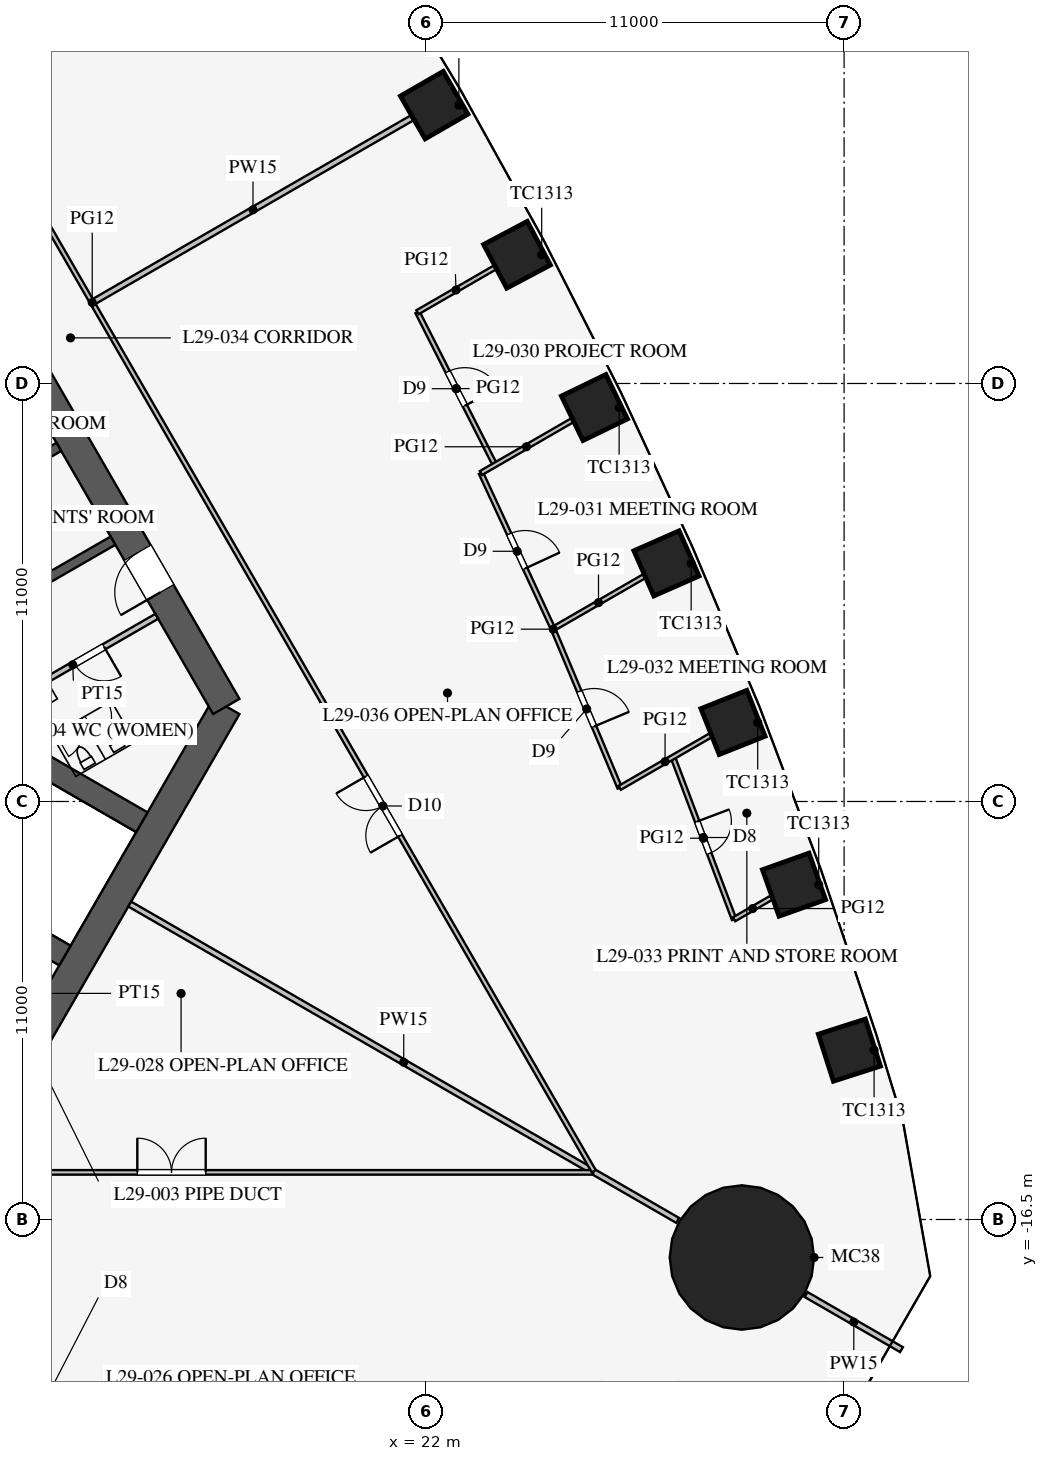
"""IFC4 building model, lengths in metres.
Left out: names, types, materials, properties, quantities, classifications, styles, units other than length and angle.
Written with IfcOpenShell. Run it as: python <this file> out.ifc"""

import sys

from ifc_helpers import new_model, si_unit, direction, frame, frame_2d, origin, origin_2d, place, context, subcontext, project, spatial, rectangle, circle, extrude, element, fill, save


model = new_model("IFC4")
c1 = context("Model", 3, precision=1e-05, world=origin(), true_north=direction((0.0, 1.0)))
c2 = subcontext(c1, "Body", "Model", "MODEL_VIEW")
j1 = project(units=[si_unit("LENGTHUNIT", "METRE"), si_unit("PLANEANGLEUNIT", "RADIAN")], contexts=[c1])
p1 = place(None, origin())
s1 = spatial("IfcSite", under=j1, at=p1, CompositionType="ELEMENT")
p2 = place(p1, origin())
s2 = spatial("IfcBuilding", under=s1, at=p2, CompositionType="ELEMENT")
p3 = place(p2, frame((0.0, 0.0, 128.3)))
s3 = spatial("IfcBuildingStorey", under=s2, at=p3, CompositionType="ELEMENT", Elevation=128.3)
for number, where, z_axis, x_axis in (
    (1, (33.139, -12.044, 0.0), (0.0, 0.0, 1.0), (-0.305, 0.952, 0.0)),
    (2, (31.682, -7.689, 0.0), (0.0, 0.0, 1.0), (-0.336, 0.942, 0.0)),
    (3, (30.077, -3.42, 0.0), (0.0, 0.0, 1.0), (-0.37, 0.929, 0.0)),
    (4, (28.325, 0.765, 0.0), (0.0, 0.0, 1.0), (-0.403, 0.915, 0.0)),
    (5, (26.43, 4.867, 0.0), (0.0, 0.0, 1.0), (-0.436, 0.9, 0.0)),
    (6, (24.393, 8.887, 0.0), (0.0, 0.0, 1.0), (-0.468, 0.883, 0.0)),
    (7, (22.213, 12.825, 0.0), (0.0, 0.0, 1.0), (-0.5, 0.866, 0.0)),
):
    element("IfcColumn", number, at=place(p3, frame(where, z_axis=z_axis, x_axis=x_axis)), inside=s3, PredefinedType="COLUMN", context=c2, shape_type="SweptSolid", body=[
        extrude(rectangle(XDim=1.3, YDim=1.3, at=origin_2d()), origin(), (0.0, 0.0, 1.0), 4.2),
    ])
p4 = place(p3, frame((30.311, -17.5, 0.0), z_axis=(0.0, 0.0, 1.0), x_axis=(1.0, 0.0, 0.0)))
e8 = element("IfcColumn", 8, at=p4, inside=s3, PredefinedType="COLUMN", context=c2, shape_type="SweptSolid", body=[
    extrude(circle(Radius=1.9, at=origin_2d()), origin(), (0.0, 0.0, 1.0), 4.2),
])
p5 = place(p3, frame((10.97, -13.0, 0.0), z_axis=(0.0, 0.0, 1.0), x_axis=(0.499995765644, 0.866027848477, 0.0)))
e9 = element("IfcWall", 9, at=p5, inside=s3, PredefinedType="SHEAR", context=c2, shape_type="SweptSolid", body=[
    extrude(rectangle(XDim=11.547, YDim=0.8, at=frame_2d((5.773, 0.0))), origin(), (0.0, 0.0, 1.0), 4.2),
])
p6 = place(p3, frame((16.743, -3.0, 0.0), z_axis=(0.0, 0.0, 1.0), x_axis=(-0.500002442456, 0.866023993627, 0.0)))
e10 = element("IfcWall", 10, at=p6, inside=s3, PredefinedType="SHEAR", context=c2, shape_type="SweptSolid", body=[
    extrude(rectangle(XDim=21.939, YDim=0.8, at=frame_2d((10.97, 0.0))), origin(), (0.0, 0.0, 1.0), 4.2),
])
p7 = place(p6, frame((17.27, 0.0, 0.0)))
e11 = element("IfcOpeningElement", 11, at=p7, cuts=e10, PredefinedType="OPENING", context=c2, shape_type="SweptSolid", body=[
    extrude(rectangle(XDim=1.2, YDim=2.1, at=frame_2d((0.6, 1.05))), frame((0.0, 0.41, 0.0), z_axis=(0.0, -1.0, 0.0), x_axis=(1.0, 0.0, 0.0)), (0.0, 0.0, 1.0), 0.82),
])
p8 = place(p6, frame((3.47, 0.0, 0.0)))
e12 = element("IfcOpeningElement", 12, at=p8, cuts=e10, PredefinedType="OPENING", context=c2, shape_type="SweptSolid", body=[
    extrude(rectangle(XDim=1.2, YDim=2.1, at=frame_2d((0.6, 1.05))), frame((0.0, 0.41, 0.0), z_axis=(0.0, -1.0, 0.0), x_axis=(1.0, 0.0, 0.0)), (0.0, 0.0, 1.0), 0.82),
])
for number, where, z_axis, x_axis in (
    (13, (11.532, 0.076, 0.0), (0.0, 0.0, 1.0), (0.866, 0.5, 0.0)),
    (14, (10.107, 2.544, 0.0), (0.0, 0.0, 1.0), (0.866, 0.5, 0.0)),
):
    element("IfcWall", number, at=place(p3, frame(where, z_axis=z_axis, x_axis=x_axis)), inside=s3, PredefinedType="SHEAR", context=c2, shape_type="SweptSolid", body=[
        extrude(rectangle(XDim=2.575, YDim=0.25, at=frame_2d((1.288, 0.0))), origin(), (0.0, 0.0, 1.0), 4.2),
    ])
for number, where, z_axis, x_axis in (
    (15, (4.638, -5.016, 0.0), (0.0, 0.0, 1.0), (0.866, -0.5, 0.0)),
    (16, (6.663, -1.509, 0.0), (0.0, 0.0, 1.0), (0.866, -0.5, 0.0)),
):
    element("IfcWall", number, at=place(p3, frame(where, z_axis=z_axis, x_axis=x_axis)), inside=s3, PredefinedType="SHEAR", context=c2, shape_type="SweptSolid", body=[
        extrude(rectangle(XDim=9.075, YDim=0.6, at=frame_2d((4.538, 0.0))), origin(), (0.0, 0.0, 1.0), 4.2),
    ])
p9 = place(p3, frame((10.495, -3.178, 0.0), z_axis=(0.0, 0.0, 1.0), x_axis=(0.86602216432, 0.500005610874, 0.0)))
e17 = element("IfcWall", 17, at=p9, inside=s3, PredefinedType="PARTITIONING", context=c2, shape_type="SweptSolid", body=[
    extrude(rectangle(XDim=5.1, YDim=0.15, at=frame_2d((2.55, 0.0))), origin(), (0.0, 0.0, 1.0), 4.0),
])
p10 = place(p9, frame((2.6, 0.0, 0.0)))
e18 = element("IfcOpeningElement", 18, at=p10, cuts=e17, PredefinedType="OPENING", context=c2, shape_type="SweptSolid", body=[
    extrude(rectangle(XDim=0.9, YDim=2.1, at=frame_2d((0.45, 1.05))), frame((0.0, 0.085, 0.0), z_axis=(0.0, -1.0, 0.0), x_axis=(1.0, 0.0, 0.0)), (0.0, 0.0, 1.0), 0.17),
])
p11 = place(p3, frame((14.203, -8.2, 0.0), z_axis=(0.0, 0.0, 1.0), x_axis=(0.866024668836, -0.500001272966, 0.0)))
e19 = element("IfcWall", 19, at=p11, inside=s3, PredefinedType="PARTITIONING", context=c2, shape_type="SweptSolid", body=[
    extrude(rectangle(XDim=16.65, YDim=0.15, at=frame_2d((8.325, 0.0))), origin(), (0.0, 0.0, 1.0), 2.3),
])
p12 = place(p3, frame((32.0, -18.475, 0.0), z_axis=(0.0, 0.0, 1.0), x_axis=(0.866042548026, -0.499970304126, 0.0)))
e20 = element("IfcWall", 20, at=p12, inside=s3, PredefinedType="PARTITIONING", context=c2, shape_type="SweptSolid", body=[
    extrude(rectangle(XDim=2.899, YDim=0.15, at=frame_2d((1.45, 0.0))), origin(), (0.0, 0.0, 1.0), 2.3),
])
p13 = place(p3, frame((-26.398, -15.26, 0.0), z_axis=(0.0, 0.0, 1.0), x_axis=(1.0, 0.0, 0.0)))
e21 = element("IfcWall", 21, at=p13, inside=s3, PredefinedType="PARTITIONING", context=c2, shape_type="SweptSolid", body=[
    extrude(rectangle(XDim=52.796, YDim=0.12, at=frame_2d((26.398, 0.0))), origin(), (0.0, 0.0, 1.0), 2.9),
])
p14 = place(p13, frame((10.2, 0.0, 0.15)))
e22 = element("IfcOpeningElement", 22, at=p14, cuts=e21, PredefinedType="OPENING", context=c2, shape_type="SweptSolid", body=[
    extrude(rectangle(XDim=1.8, YDim=2.1, at=frame_2d((0.9, 1.05))), frame((0.0, 0.07, 0.0), z_axis=(0.0, -1.0, 0.0), x_axis=(1.0, 0.0, 0.0)), (0.0, 0.0, 1.0), 0.14),
])
p15 = place(p13, frame((40.8, 0.0, 0.15)))
e23 = element("IfcOpeningElement", 23, at=p15, cuts=e21, PredefinedType="OPENING", context=c2, shape_type="SweptSolid", body=[
    extrude(rectangle(XDim=1.8, YDim=2.1, at=frame_2d((0.9, 1.05))), frame((0.0, 0.07, 0.0), z_axis=(0.0, -1.0, 0.0), x_axis=(1.0, 0.0, 0.0)), (0.0, 0.0, 1.0), 0.14),
])
p16 = place(p3, frame((13.268, 7.66, 0.0), z_axis=(0.0, 0.0, 1.0), x_axis=(0.866015788683, 0.500016653474, 0.0)))
e24 = element("IfcWall", 24, at=p16, inside=s3, PredefinedType="PARTITIONING", context=c2, shape_type="SweptSolid", body=[
    extrude(rectangle(XDim=9.65, YDim=0.15, at=frame_2d((4.825, 0.0))), origin(), (0.0, 0.0, 1.0), 3.2),
])
p17 = place(p3, frame((26.415, -15.231, 0.0), z_axis=(0.0, 0.0, 1.0), x_axis=(-0.50000091641, 0.866024874695, 0.0)))
e25 = element("IfcWall", 25, at=p17, inside=s3, PredefinedType="PARTITIONING", context=c2, shape_type="SweptSolid", body=[
    extrude(rectangle(XDim=52.796, YDim=0.12, at=frame_2d((26.398, 0.0))), origin(), (0.0, 0.0, 1.0), 2.9),
])
p18 = place(p17, frame((10.2, 0.0, 0.15)))
e26 = element("IfcOpeningElement", 26, at=p18, cuts=e25, PredefinedType="OPENING", context=c2, shape_type="SweptSolid", body=[
    extrude(rectangle(XDim=1.8, YDim=2.1, at=frame_2d((0.9, 1.05))), frame((0.0, 0.07, 0.0), z_axis=(0.0, -1.0, 0.0), x_axis=(1.0, 0.0, 0.0)), (0.0, 0.0, 1.0), 0.14),
])
p19 = place(p17, frame((40.8, 0.0, 0.15)))
e27 = element("IfcOpeningElement", 27, at=p19, cuts=e25, PredefinedType="OPENING", context=c2, shape_type="SweptSolid", body=[
    extrude(rectangle(XDim=1.8, YDim=2.1, at=frame_2d((0.9, 1.05))), frame((0.0, 0.07, 0.0), z_axis=(0.0, -1.0, 0.0), x_axis=(1.0, 0.0, 0.0)), (0.0, 0.0, 1.0), 0.14),
])
p20 = place(p3, frame((25.342, -0.958, 0.0), z_axis=(0.0, 0.0, 1.0), x_axis=(-0.419883773418, 0.907577884713, 0.0)))
e28 = element("IfcWall", 28, at=p20, inside=s3, PredefinedType="PARTITIONING", context=c2, shape_type="SweptSolid", body=[
    extrude(rectangle(XDim=4.519, YDim=0.12, at=frame_2d((2.259, 0.0))), origin(), (0.0, 0.0, 1.0), 2.9),
])
p21 = place(p20, frame((1.75, 0.0, 0.15)))
e29 = element("IfcOpeningElement", 29, at=p21, cuts=e28, PredefinedType="OPENING", context=c2, shape_type="SweptSolid", body=[
    extrude(rectangle(XDim=1.0, YDim=2.1, at=frame_2d((0.5, 1.05))), frame((0.0, 0.07, 0.0), z_axis=(0.0, -1.0, 0.0), x_axis=(1.0, 0.0, 0.0)), (0.0, 0.0, 1.0), 0.14),
])
p22 = place(p3, frame((27.096, -5.141, 0.0), z_axis=(0.0, 0.0, 1.0), x_axis=(-0.386807881778, 0.922160323693, 0.0)))
e30 = element("IfcWall", 30, at=p22, inside=s3, PredefinedType="PARTITIONING", context=c2, shape_type="SweptSolid", body=[
    extrude(rectangle(XDim=4.536, YDim=0.12, at=frame_2d((2.268, 0.0))), origin(), (0.0, 0.0, 1.0), 2.9),
])
p23 = place(p22, frame((1.75, 0.0, 0.15)))
e31 = element("IfcOpeningElement", 31, at=p23, cuts=e30, PredefinedType="OPENING", context=c2, shape_type="SweptSolid", body=[
    extrude(rectangle(XDim=1.0, YDim=2.1, at=frame_2d((0.5, 1.05))), frame((0.0, 0.07, 0.0), z_axis=(0.0, -1.0, 0.0), x_axis=(1.0, 0.0, 0.0)), (0.0, 0.0, 1.0), 0.14),
])
p24 = place(p3, frame((30.104, -8.6, 0.0), z_axis=(0.0, 0.0, 1.0), x_axis=(-0.35295910498, 0.935638749845, 0.0)))
e32 = element("IfcWall", 32, at=p24, inside=s3, PredefinedType="PARTITIONING", context=c2, shape_type="SweptSolid", body=[
    extrude(rectangle(XDim=4.56, YDim=0.12, at=frame_2d((2.28, 0.0))), origin(), (0.0, 0.0, 1.0), 2.9),
])
p25 = place(p24, frame((1.85, 0.0, 0.15)))
e33 = element("IfcOpeningElement", 33, at=p25, cuts=e32, PredefinedType="OPENING", context=c2, shape_type="SweptSolid", body=[
    extrude(rectangle(XDim=0.9, YDim=2.1, at=frame_2d((0.45, 1.05))), frame((0.0, 0.07, 0.0), z_axis=(0.0, -1.0, 0.0), x_axis=(1.0, 0.0, 0.0)), (0.0, 0.0, 1.0), 0.14),
])
p26 = place(p3, frame((23.812, 3.356, 0.0), z_axis=(0.0, 0.0, 1.0), x_axis=(-0.452449820092, 0.891789863308, 0.0)))
e34 = element("IfcWall", 34, at=p26, inside=s3, PredefinedType="PARTITIONING", context=c2, shape_type="SweptSolid", body=[
    extrude(rectangle(XDim=4.507, YDim=0.12, at=frame_2d((2.253, 0.0))), origin(), (0.0, 0.0, 1.0), 2.9),
])
p27 = place(p26, frame((1.75, 0.0, 0.15)))
e35 = element("IfcOpeningElement", 35, at=p27, cuts=e34, PredefinedType="OPENING", context=c2, shape_type="SweptSolid", body=[
    extrude(rectangle(XDim=1.0, YDim=2.1, at=frame_2d((0.5, 1.05))), frame((0.0, 0.07, 0.0), z_axis=(0.0, -1.0, 0.0), x_axis=(1.0, 0.0, 0.0)), (0.0, 0.0, 1.0), 0.14),
])
p28 = place(p3, frame((25.342, -0.958, 0.0), z_axis=(0.0, 0.0, 1.0), x_axis=(0.866014808974, 0.500018350302, 0.0)))
e36 = element("IfcWall", 36, at=p28, inside=s3, PredefinedType="PARTITIONING", context=c2, shape_type="SweptSolid", body=[
    extrude(rectangle(XDim=2.762, YDim=0.12, at=frame_2d((1.381, 0.0))), origin(), (0.0, 0.0, 1.0), 2.9),
])
p29 = place(p3, frame((27.096, -5.141, 0.0), z_axis=(0.0, 0.0, 1.0), x_axis=(0.866014354455, 0.500019137511, 0.0)))
e37 = element("IfcWall", 37, at=p29, inside=s3, PredefinedType="PARTITIONING", context=c2, shape_type="SweptSolid", body=[
    extrude(rectangle(XDim=2.754, YDim=0.12, at=frame_2d((1.377, 0.0))), origin(), (0.0, 0.0, 1.0), 2.9),
])
p30 = place(p3, frame((30.104, -8.6, 0.0), z_axis=(0.0, 0.0, 1.0), x_axis=(0.866041729639, 0.499971721724, 0.0)))
e38 = element("IfcWall", 38, at=p30, inside=s3, PredefinedType="PARTITIONING", context=c2, shape_type="SweptSolid", body=[
    extrude(rectangle(XDim=1.13, YDim=0.12, at=frame_2d((0.565, 0.0))), origin(), (0.0, 0.0, 1.0), 2.9),
])
p31 = place(p3, frame((21.773, 7.375, 0.0), z_axis=(0.0, 0.0, 1.0), x_axis=(0.866055506462, 0.499947857008, 0.0)))
e39 = element("IfcWall", 39, at=p31, inside=s3, PredefinedType="PARTITIONING", context=c2, shape_type="SweptSolid", body=[
    extrude(rectangle(XDim=2.344, YDim=0.12, at=frame_2d((1.172, 0.0))), origin(), (0.0, 0.0, 1.0), 2.9),
])
p32 = place(p3, frame((23.444, 3.143, 0.0), z_axis=(0.0, 0.0, 1.0), x_axis=(0.866023907196, 0.500002592159, 0.0)))
e40 = element("IfcWall", 40, at=p32, inside=s3, PredefinedType="PARTITIONING", context=c2, shape_type="SweptSolid", body=[
    extrude(rectangle(XDim=2.766, YDim=0.12, at=frame_2d((1.383, 0.0))), origin(), (0.0, 0.0, 1.0), 2.9),
])
p33 = place(p10, frame((0.9, 0.0, 0.0), z_axis=(0.0, 0.0, 1.0), x_axis=(-1.0, 0.0, 0.0)))
e41 = element("IfcDoor", 41, at=p33, inside=s3, OperationType="SINGLE_SWING_LEFT", PredefinedType="DOOR", context=c2, shape_type="SweptSolid", body=[
    extrude(rectangle(XDim=0.9, YDim=2.1, at=frame_2d((0.45, 1.05))), frame((0.0, 0.025, 0.0), z_axis=(0.0, -1.0, 0.0), x_axis=(1.0, 0.0, 0.0)), (0.0, 0.0, 1.0), 0.05),
])
fill(e18, e41)
p34 = place(p8, origin())
e42 = element("IfcDoor", 42, at=p34, inside=s3, OperationType="SINGLE_SWING_LEFT", PredefinedType="DOOR", context=c2, shape_type="SweptSolid", body=[
    extrude(rectangle(XDim=1.2, YDim=2.1, at=frame_2d((0.6, 1.05))), frame((0.0, 0.025, 0.0), z_axis=(0.0, -1.0, 0.0), x_axis=(1.0, 0.0, 0.0)), (0.0, 0.0, 1.0), 0.05),
])
fill(e12, e42)
p35 = place(p15, origin())
e43 = element("IfcDoor", 43, at=p35, inside=s3, OperationType="DOUBLE_DOOR_SINGLE_SWING", PredefinedType="DOOR", context=c2, shape_type="SweptSolid", body=[
    extrude(rectangle(XDim=1.8, YDim=2.1, at=frame_2d((0.9, 1.05))), frame((0.0, 0.025, 0.0), z_axis=(0.0, -1.0, 0.0), x_axis=(1.0, 0.0, 0.0)), (0.0, 0.0, 1.0), 0.05),
])
fill(e23, e43)
p36 = place(p27, frame((1.0, 0.0, 0.0), z_axis=(0.0, 0.0, 1.0), x_axis=(-1.0, 0.0, 0.0)))
e44 = element("IfcDoor", 44, at=p36, inside=s3, OperationType="SINGLE_SWING_RIGHT", PredefinedType="DOOR", context=c2, shape_type="SweptSolid", body=[
    extrude(rectangle(XDim=1.0, YDim=2.1, at=frame_2d((0.5, 1.05))), frame((0.0, 0.025, 0.0), z_axis=(0.0, -1.0, 0.0), x_axis=(1.0, 0.0, 0.0)), (0.0, 0.0, 1.0), 0.05),
])
fill(e35, e44)
p37 = place(p21, frame((1.0, 0.0, 0.0), z_axis=(0.0, 0.0, 1.0), x_axis=(-1.0, 0.0, 0.0)))
e45 = element("IfcDoor", 45, at=p37, inside=s3, OperationType="SINGLE_SWING_RIGHT", PredefinedType="DOOR", context=c2, shape_type="SweptSolid", body=[
    extrude(rectangle(XDim=1.0, YDim=2.1, at=frame_2d((0.5, 1.05))), frame((0.0, 0.025, 0.0), z_axis=(0.0, -1.0, 0.0), x_axis=(1.0, 0.0, 0.0)), (0.0, 0.0, 1.0), 0.05),
])
fill(e29, e45)
p38 = place(p23, frame((1.0, 0.0, 0.0), z_axis=(0.0, 0.0, 1.0), x_axis=(-1.0, 0.0, 0.0)))
e46 = element("IfcDoor", 46, at=p38, inside=s3, OperationType="SINGLE_SWING_RIGHT", PredefinedType="DOOR", context=c2, shape_type="SweptSolid", body=[
    extrude(rectangle(XDim=1.0, YDim=2.1, at=frame_2d((0.5, 1.05))), frame((0.0, 0.025, 0.0), z_axis=(0.0, -1.0, 0.0), x_axis=(1.0, 0.0, 0.0)), (0.0, 0.0, 1.0), 0.05),
])
fill(e31, e46)
p39 = place(p25, frame((0.9, 0.0, 0.0), z_axis=(0.0, 0.0, 1.0), x_axis=(-1.0, 0.0, 0.0)))
e47 = element("IfcDoor", 47, at=p39, inside=s3, OperationType="SINGLE_SWING_LEFT", PredefinedType="DOOR", context=c2, shape_type="SweptSolid", body=[
    extrude(rectangle(XDim=0.9, YDim=2.1, at=frame_2d((0.45, 1.05))), frame((0.0, 0.025, 0.0), z_axis=(0.0, -1.0, 0.0), x_axis=(1.0, 0.0, 0.0)), (0.0, 0.0, 1.0), 0.05),
])
fill(e33, e47)
p40 = place(p18, origin())
e48 = element("IfcDoor", 48, at=p40, inside=s3, OperationType="DOUBLE_DOOR_SINGLE_SWING", PredefinedType="DOOR", context=c2, shape_type="SweptSolid", body=[
    extrude(rectangle(XDim=1.8, YDim=2.1, at=frame_2d((0.9, 1.05))), frame((0.0, 0.025, 0.0), z_axis=(0.0, -1.0, 0.0), x_axis=(1.0, 0.0, 0.0)), (0.0, 0.0, 1.0), 0.05),
])
fill(e26, e48)
save(model, sys.argv[1])
